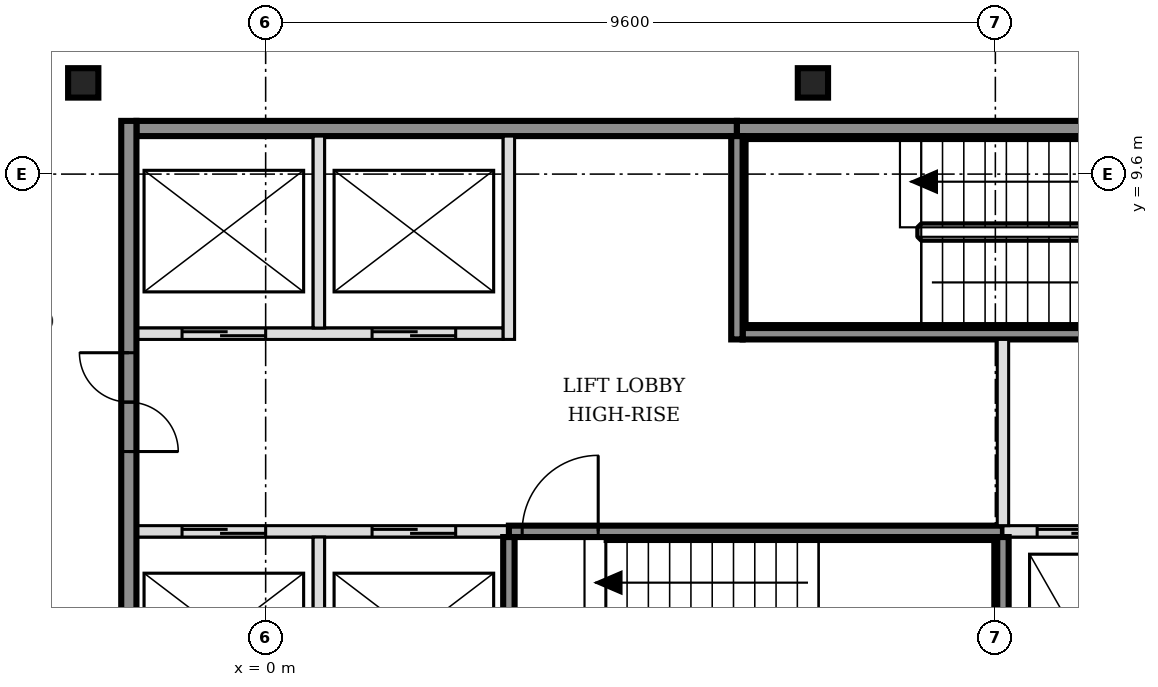
"""IFC4 building model, lengths in metres.
Left out: names, types, materials, properties, quantities, classifications, styles, units other than length and angle.
Written with IfcOpenShell. Run it as: python <this file> out.ifc"""

import sys

from ifc_helpers import new_model, si_unit, direction, frame, frame_2d, origin, origin_2d, place, context, subcontext, project, spatial, rectangle, i_section, extrude, element, fill, save


model = new_model("IFC4")
c1 = context("Model", 3, precision=1e-05, world=origin(), true_north=direction((0.0, 1.0)))
c2 = subcontext(c1, "Body", "Model", "MODEL_VIEW")
j1 = project(units=[si_unit("LENGTHUNIT", "METRE"), si_unit("PLANEANGLEUNIT", "RADIAN")], contexts=[c1])
p1 = place(None, origin())
s1 = spatial("IfcSite", under=j1, at=p1, CompositionType="ELEMENT")
p2 = place(p1, origin())
s2 = spatial("IfcBuilding", under=s1, at=p2, CompositionType="ELEMENT")
p3 = place(p2, frame((0.0, 0.0, 253.8)))
s3 = spatial("IfcBuildingStorey", under=s2, at=p3, CompositionType="ELEMENT", Elevation=253.8)
for number, where, z_axis, x_axis in (
    (1, (-2.4, 10.8, -0.15), (0.0, 0.0, 1.0), (1.0, 0.0, 0.0)),
    (2, (7.2, 10.8, -0.15), (0.0, 0.0, 1.0), (1.0, 0.0, 0.0)),
):
    element("IfcColumn", number, at=place(p3, frame(where, z_axis=z_axis, x_axis=x_axis)), inside=s3, PredefinedType="COLUMN", context=c2, shape_type="SweptSolid", body=[
        extrude(i_section(OverallWidth=0.398, OverallDepth=0.387, WebThickness=0.021, FlangeThickness=0.033, FilletRadius=0.015, at=origin_2d()), origin(), (0.0, 0.0, 1.0), 3.6),
    ])
p4 = place(p3, frame((-1.7, 4.9, 0.0), z_axis=(0.0, 0.0, 1.0), x_axis=(1.0, 0.0, 0.0)))
e3 = element("IfcWall", 3, at=p4, inside=s3, PredefinedType="SOLIDWALL", context=c2, shape_type="SweptSolid", body=[
    extrude(rectangle(XDim=4.9, YDim=0.15, at=frame_2d((2.45, 0.0))), origin(), (0.0, 0.0, 1.0), 3.45),
])
p5 = place(p4, frame((0.6, 0.0, 0.0)))
e4 = element("IfcOpeningElement", 4, at=p5, cuts=e3, PredefinedType="OPENING", context=c2, shape_type="SweptSolid", body=[
    extrude(rectangle(XDim=1.1, YDim=2.1, at=frame_2d((0.55, 1.05))), frame((0.0, 0.085, 0.0), z_axis=(0.0, -1.0, 0.0), x_axis=(1.0, 0.0, 0.0)), (0.0, 0.0, 1.0), 0.17),
])
p6 = place(p4, frame((3.1, 0.0, 0.0)))
e5 = element("IfcOpeningElement", 5, at=p6, cuts=e3, PredefinedType="OPENING", context=c2, shape_type="SweptSolid", body=[
    extrude(rectangle(XDim=1.1, YDim=2.1, at=frame_2d((0.55, 1.05))), frame((0.0, 0.085, 0.0), z_axis=(0.0, -1.0, 0.0), x_axis=(1.0, 0.0, 0.0)), (0.0, 0.0, 1.0), 0.17),
])
p7 = place(p3, frame((3.2, 4.9, 0.0), z_axis=(0.0, 0.0, 1.0), x_axis=(1.0, 0.0, 0.0)))
e6 = element("IfcWall", 6, at=p7, inside=s3, PredefinedType="SOLIDWALL", context=c2, shape_type="SweptSolid", body=[
    extrude(rectangle(XDim=6.5, YDim=0.15, at=frame_2d((3.25, 0.0))), origin(), (0.0, 0.0, 1.0), 3.45),
])
p8 = place(p7, frame((0.175, 0.0, 0.0)))
e7 = element("IfcOpeningElement", 7, at=p8, cuts=e6, PredefinedType="OPENING", context=c2, shape_type="SweptSolid", body=[
    extrude(rectangle(XDim=1.0, YDim=2.1, at=frame_2d((0.5, 1.05))), frame((0.0, 0.085, 0.0), z_axis=(0.0, -1.0, 0.0), x_axis=(1.0, 0.0, 0.0)), (0.0, 0.0, 1.0), 0.17),
])
p9 = place(p3, frame((9.7, 4.9, 0.0), z_axis=(0.0, 0.0, 1.0), x_axis=(1.0, 0.0, 0.0)))
e8 = element("IfcWall", 8, at=p9, inside=s3, PredefinedType="SOLIDWALL", context=c2, shape_type="SweptSolid", body=[
    extrude(rectangle(XDim=6.4, YDim=0.15, at=frame_2d((3.2, 0.0))), origin(), (0.0, 0.0, 1.0), 3.45),
])
p10 = place(p9, frame((0.45, 0.0, 0.0)))
e9 = element("IfcOpeningElement", 9, at=p10, cuts=e8, PredefinedType="OPENING", context=c2, shape_type="SweptSolid", body=[
    extrude(rectangle(XDim=1.0, YDim=2.1, at=frame_2d((0.5, 1.05))), frame((0.0, 0.085, 0.0), z_axis=(0.0, -1.0, 0.0), x_axis=(1.0, 0.0, 0.0)), (0.0, 0.0, 1.0), 0.17),
])
p11 = place(p9, frame((2.35, 0.0, 0.0)))
e10 = element("IfcOpeningElement", 10, at=p11, cuts=e8, PredefinedType="OPENING", context=c2, shape_type="SweptSolid", body=[
    extrude(rectangle(XDim=1.0, YDim=2.1, at=frame_2d((0.5, 1.05))), frame((0.0, 0.085, 0.0), z_axis=(0.0, -1.0, 0.0), x_axis=(1.0, 0.0, 0.0)), (0.0, 0.0, 1.0), 0.17),
])
p12 = place(p9, frame((4.7, 0.0, 0.0)))
e11 = element("IfcOpeningElement", 11, at=p12, cuts=e8, PredefinedType="OPENING", context=c2, shape_type="SweptSolid", body=[
    extrude(rectangle(XDim=0.9, YDim=2.1, at=frame_2d((0.45, 1.05))), frame((0.0, 0.085, 0.0), z_axis=(0.0, -1.0, 0.0), x_axis=(1.0, 0.0, 0.0)), (0.0, 0.0, 1.0), 0.17),
])
p13 = place(p3, frame((-1.7, 7.5, 0.0), z_axis=(0.0, 0.0, 1.0), x_axis=(1.0, 0.0, 0.0)))
e12 = element("IfcWall", 12, at=p13, inside=s3, PredefinedType="SOLIDWALL", context=c2, shape_type="SweptSolid", body=[
    extrude(rectangle(XDim=4.825, YDim=0.15, at=frame_2d((2.413, 0.0))), origin(), (0.0, 0.0, 1.0), 3.45),
])
p14 = place(p13, frame((0.6, 0.0, 0.0)))
e13 = element("IfcOpeningElement", 13, at=p14, cuts=e12, PredefinedType="OPENING", context=c2, shape_type="SweptSolid", body=[
    extrude(rectangle(XDim=1.1, YDim=2.1, at=frame_2d((0.55, 1.05))), frame((0.0, 0.085, 0.0), z_axis=(0.0, -1.0, 0.0), x_axis=(1.0, 0.0, 0.0)), (0.0, 0.0, 1.0), 0.17),
])
p15 = place(p13, frame((3.1, 0.0, 0.0)))
e14 = element("IfcOpeningElement", 14, at=p15, cuts=e12, PredefinedType="OPENING", context=c2, shape_type="SweptSolid", body=[
    extrude(rectangle(XDim=1.1, YDim=2.1, at=frame_2d((0.55, 1.05))), frame((0.0, 0.085, 0.0), z_axis=(0.0, -1.0, 0.0), x_axis=(1.0, 0.0, 0.0)), (0.0, 0.0, 1.0), 0.17),
])
p16 = place(p3, frame((6.275, 7.5, 0.0), z_axis=(0.0, 0.0, 1.0), x_axis=(1.0, 0.0, 0.0)))
e15 = element("IfcWall", 15, at=p16, inside=s3, PredefinedType="SOLIDWALL", context=c2, shape_type="SweptSolid", body=[
    extrude(rectangle(XDim=6.425, YDim=0.15, at=frame_2d((3.212, 0.0))), origin(), (0.0, 0.0, 1.0), 3.45),
])
p17 = place(p16, frame((5.225, 0.0, 0.0)))
e16 = element("IfcOpeningElement", 16, at=p17, cuts=e15, PredefinedType="OPENING", context=c2, shape_type="SweptSolid", body=[
    extrude(rectangle(XDim=1.0, YDim=2.1, at=frame_2d((0.5, 1.05))), frame((0.0, 0.085, 0.0), z_axis=(0.0, -1.0, 0.0), x_axis=(1.0, 0.0, 0.0)), (0.0, 0.0, 1.0), 0.17),
])
p18 = place(p3, frame((-1.7, 10.2, 0.0), z_axis=(0.0, 0.0, 1.0), x_axis=(1.0, 0.0, 0.0)))
e17 = element("IfcWall", 17, at=p18, inside=s3, PredefinedType="SOLIDWALL", context=c2, shape_type="SweptSolid", body=[
    extrude(rectangle(XDim=7.9, YDim=0.2, at=frame_2d((3.95, 0.0))), origin(), (0.0, 0.0, 1.0), 3.45),
])
p19 = place(p3, frame((6.2, 10.2, 0.0), z_axis=(0.0, 0.0, 1.0), x_axis=(1.0, 0.0, 0.0)))
e18 = element("IfcWall", 18, at=p19, inside=s3, PredefinedType="SOLIDWALL", context=c2, shape_type="SweptSolid", body=[
    extrude(rectangle(XDim=6.5, YDim=0.2, at=frame_2d((3.25, 0.0))), origin(), (0.0, 0.0, 1.0), 3.45),
])
p20 = place(p3, frame((-1.8, -5.5, 0.0), z_axis=(0.0, 0.0, 1.0), x_axis=(0.0, 1.0, 0.0)))
e19 = element("IfcWall", 19, at=p20, inside=s3, PredefinedType="SOLIDWALL", context=c2, shape_type="SweptSolid", body=[
    extrude(rectangle(XDim=15.8, YDim=0.2, at=frame_2d((7.9, 0.0))), origin(), (0.0, 0.0, 1.0), 3.45),
])
p21 = place(p20, frame((3.05, 0.0, 0.0)))
e20 = element("IfcOpeningElement", 20, at=p21, cuts=e19, PredefinedType="OPENING", context=c2, shape_type="SweptSolid", body=[
    extrude(rectangle(XDim=1.3, YDim=2.1, at=frame_2d((0.65, 1.05))), frame((0.0, 0.11, 0.0), z_axis=(0.0, -1.0, 0.0), x_axis=(1.0, 0.0, 0.0)), (0.0, 0.0, 1.0), 0.22),
])
p22 = place(p20, frame((11.45, 0.0, 0.0)))
e21 = element("IfcOpeningElement", 21, at=p22, cuts=e19, PredefinedType="OPENING", context=c2, shape_type="SweptSolid", body=[
    extrude(rectangle(XDim=1.3, YDim=2.1, at=frame_2d((0.65, 1.05))), frame((0.0, 0.11, 0.0), z_axis=(0.0, -1.0, 0.0), x_axis=(1.0, 0.0, 0.0)), (0.0, 0.0, 1.0), 0.22),
])
p23 = place(p3, frame((0.7, 2.275, 0.0), z_axis=(0.0, 0.0, 1.0), x_axis=(0.0, 1.0, 0.0)))
e22 = element("IfcWall", 22, at=p23, inside=s3, PredefinedType="SOLIDWALL", context=c2, shape_type="SweptSolid", body=[
    extrude(rectangle(XDim=2.55, YDim=0.15, at=frame_2d((1.275, 0.0))), origin(), (0.0, 0.0, 1.0), 3.45),
])
p24 = place(p3, frame((0.7, 7.575, 0.0), z_axis=(0.0, 0.0, 1.0), x_axis=(0.0, 1.0, 0.0)))
e23 = element("IfcWall", 23, at=p24, inside=s3, PredefinedType="SOLIDWALL", context=c2, shape_type="SweptSolid", body=[
    extrude(rectangle(XDim=2.525, YDim=0.15, at=frame_2d((1.263, 0.0))), origin(), (0.0, 0.0, 1.0), 3.45),
])
p25 = place(p3, frame((3.2, 2.275, 0.0), z_axis=(0.0, 0.0, 1.0), x_axis=(0.0, 1.0, 0.0)))
e24 = element("IfcWall", 24, at=p25, inside=s3, PredefinedType="SOLIDWALL", context=c2, shape_type="SweptSolid", body=[
    extrude(rectangle(XDim=2.55, YDim=0.15, at=frame_2d((1.275, 0.0))), origin(), (0.0, 0.0, 1.0), 3.45),
])
for number, where, z_axis, x_axis in (
    (25, (3.2, 7.425, 0.0), (0.0, 0.0, 1.0), (0.0, 1.0, 0.0)),
    (26, (6.2, 7.425, 0.0), (0.0, 0.0, 1.0), (0.0, 1.0, 0.0)),
):
    element("IfcWall", number, at=place(p3, frame(where, z_axis=z_axis, x_axis=x_axis)), inside=s3, PredefinedType="SOLIDWALL", context=c2, shape_type="SweptSolid", body=[
        extrude(rectangle(XDim=2.675, YDim=0.15, at=frame_2d((1.337, 0.0))), origin(), (0.0, 0.0, 1.0), 3.45),
    ])
p26 = place(p3, frame((9.7, 2.275, 0.0), z_axis=(0.0, 0.0, 1.0), x_axis=(0.0, 1.0, 0.0)))
e27 = element("IfcWall", 27, at=p26, inside=s3, PredefinedType="SOLIDWALL", context=c2, shape_type="SweptSolid", body=[
    extrude(rectangle(XDim=2.55, YDim=0.15, at=frame_2d((1.275, 0.0))), origin(), (0.0, 0.0, 1.0), 3.45),
])
p27 = place(p3, frame((9.7, 4.975, 0.0), z_axis=(0.0, 0.0, 1.0), x_axis=(0.0, 1.0, 0.0)))
e28 = element("IfcWall", 28, at=p27, inside=s3, PredefinedType="SOLIDWALL", context=c2, shape_type="SweptSolid", body=[
    extrude(rectangle(XDim=2.45, YDim=0.15, at=frame_2d((1.225, 0.0))), origin(), (0.0, 0.0, 1.0), 3.45),
])
p28 = place(p5, origin())
e29 = element("IfcDoor", 29, at=p28, inside=s3, OperationType="DOUBLE_DOOR_SLIDING", PredefinedType="DOOR", context=c2, shape_type="SweptSolid", body=[
    extrude(rectangle(XDim=1.1, YDim=2.1, at=frame_2d((0.55, 1.05))), frame((0.0, 0.025, 0.0), z_axis=(0.0, -1.0, 0.0), x_axis=(1.0, 0.0, 0.0)), (0.0, 0.0, 1.0), 0.05),
])
fill(e4, e29)
p29 = place(p6, origin())
e30 = element("IfcDoor", 30, at=p29, inside=s3, OperationType="DOUBLE_DOOR_SLIDING", PredefinedType="DOOR", context=c2, shape_type="SweptSolid", body=[
    extrude(rectangle(XDim=1.1, YDim=2.1, at=frame_2d((0.55, 1.05))), frame((0.0, 0.025, 0.0), z_axis=(0.0, -1.0, 0.0), x_axis=(1.0, 0.0, 0.0)), (0.0, 0.0, 1.0), 0.05),
])
fill(e5, e30)
p30 = place(p14, origin())
e31 = element("IfcDoor", 31, at=p30, inside=s3, OperationType="DOUBLE_DOOR_SLIDING", PredefinedType="DOOR", context=c2, shape_type="SweptSolid", body=[
    extrude(rectangle(XDim=1.1, YDim=2.1, at=frame_2d((0.55, 1.05))), frame((0.0, 0.025, 0.0), z_axis=(0.0, -1.0, 0.0), x_axis=(1.0, 0.0, 0.0)), (0.0, 0.0, 1.0), 0.05),
])
fill(e13, e31)
p31 = place(p15, origin())
e32 = element("IfcDoor", 32, at=p31, inside=s3, OperationType="DOUBLE_DOOR_SLIDING", PredefinedType="DOOR", context=c2, shape_type="SweptSolid", body=[
    extrude(rectangle(XDim=1.1, YDim=2.1, at=frame_2d((0.55, 1.05))), frame((0.0, 0.025, 0.0), z_axis=(0.0, -1.0, 0.0), x_axis=(1.0, 0.0, 0.0)), (0.0, 0.0, 1.0), 0.05),
])
fill(e14, e32)
p32 = place(p10, origin())
e33 = element("IfcDoor", 33, at=p32, inside=s3, OperationType="DOUBLE_DOOR_SLIDING", PredefinedType="DOOR", context=c2, shape_type="SweptSolid", body=[
    extrude(rectangle(XDim=1.0, YDim=2.1, at=frame_2d((0.5, 1.05))), frame((0.0, 0.025, 0.0), z_axis=(0.0, -1.0, 0.0), x_axis=(1.0, 0.0, 0.0)), (0.0, 0.0, 1.0), 0.05),
])
fill(e9, e33)
p33 = place(p8, origin())
e34 = element("IfcDoor", 34, at=p33, inside=s3, OperationType="SINGLE_SWING_RIGHT", PredefinedType="DOOR", context=c2, shape_type="SweptSolid", body=[
    extrude(rectangle(XDim=1.0, YDim=2.1, at=frame_2d((0.5, 1.05))), frame((0.0, 0.025, 0.0), z_axis=(0.0, -1.0, 0.0), x_axis=(1.0, 0.0, 0.0)), (0.0, 0.0, 1.0), 0.05),
])
fill(e7, e34)
p34 = place(p22, origin())
e35 = element("IfcDoor", 35, at=p34, inside=s3, OperationType="DOUBLE_DOOR_SINGLE_SWING", PredefinedType="DOOR", context=c2, shape_type="SweptSolid", body=[
    extrude(rectangle(XDim=1.3, YDim=2.1, at=frame_2d((0.65, 1.05))), frame((0.0, 0.025, 0.0), z_axis=(0.0, -1.0, 0.0), x_axis=(1.0, 0.0, 0.0)), (0.0, 0.0, 1.0), 0.05),
])
fill(e21, e35)
save(model, sys.argv[1])
